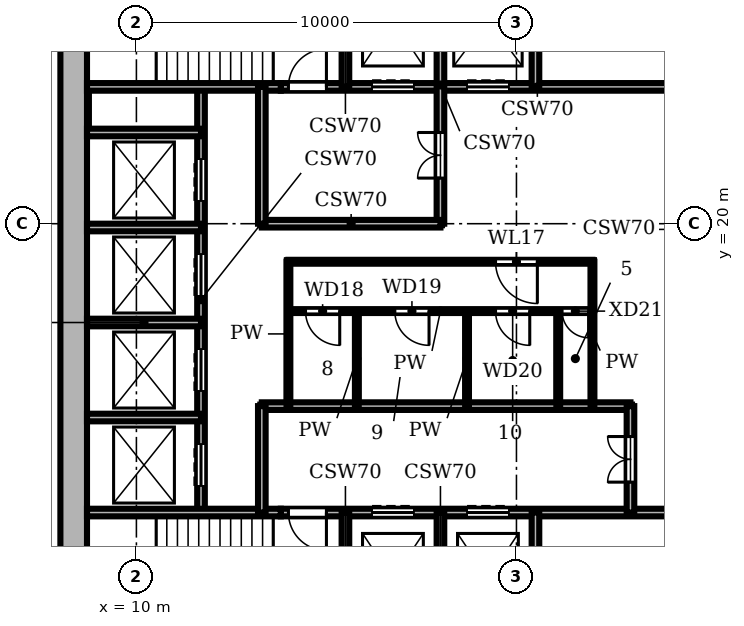
"""IFC4 building model, lengths in metres.
Left out: names, types, materials, properties, quantities, classifications, styles, units other than length and angle.
Written with IfcOpenShell. Run it as: python <this file> out.ifc"""

import sys

from ifc_helpers import new_model, si_unit, direction, frame, frame_2d, origin, place, context, subcontext, project, spatial, rectangle, extrude, element, fill, save


model = new_model("IFC4")
c1 = context("Model", 3, precision=1e-05, world=origin(), true_north=direction((0.0, 1.0)))
c2 = subcontext(c1, "Body", "Model", "MODEL_VIEW")
j1 = project(units=[si_unit("LENGTHUNIT", "METRE"), si_unit("PLANEANGLEUNIT", "RADIAN")], contexts=[c1])
p1 = place(None, origin())
s1 = spatial("IfcSite", under=j1, at=p1, CompositionType="ELEMENT")
p2 = place(p1, origin())
s2 = spatial("IfcBuilding", under=s1, at=p2, CompositionType="ELEMENT")
p3 = place(p2, frame((0.0, 0.0, 170.7)))
s3 = spatial("IfcBuildingStorey", under=s2, at=p3, CompositionType="ELEMENT", Elevation=170.7)
p4 = place(p3, frame((8.35, 27.3, 0.0), z_axis=(0.0, 0.0, 1.0), x_axis=(0.0, -1.0, 0.0)))
e1 = element("IfcWall", 1, at=p4, inside=s3, PredefinedType="SHEAR", context=c2, shape_type="SweptSolid", body=[
    extrude(rectangle(XDim=18.6, YDim=0.7, at=frame_2d((9.3, 0.0))), origin(), (0.0, 0.0, 1.0), 3.9),
])
p5 = place(p3, frame((8.7, 12.4, 0.0), z_axis=(0.0, 0.0, 1.0), x_axis=(1.0, 0.0, 0.0)))
e2 = element("IfcWall", 2, at=p5, inside=s3, PredefinedType="SHEAR", context=c2, shape_type="SweptSolid", body=[
    extrude(rectangle(XDim=5.1, YDim=0.2, at=frame_2d((2.55, 0.0))), origin(), (0.0, 0.0, 1.0), 3.58),
])
p6 = place(p3, frame((13.8, 12.4, 0.0), z_axis=(0.0, 0.0, 1.0), x_axis=(1.0, 0.0, 0.0)))
e3 = element("IfcWall", 3, at=p6, inside=s3, PredefinedType="SHEAR", context=c2, shape_type="SweptSolid", body=[
    extrude(rectangle(XDim=13.5, YDim=0.2, at=frame_2d((6.75, 0.0))), origin(), (0.0, 0.0, 1.0), 3.58),
])
p7 = place(p6, frame((2.4, 0.0, 0.0)))
e4 = element("IfcOpeningElement", 4, at=p7, cuts=e3, PredefinedType="OPENING", context=c2, shape_type="SweptSolid", body=[
    extrude(rectangle(XDim=1.1, YDim=2.1, at=frame_2d((0.55, 1.05))), frame((0.0, 0.11, 0.0), z_axis=(0.0, -1.0, 0.0), x_axis=(1.0, 0.0, 0.0)), (0.0, 0.0, 1.0), 0.22),
])
p8 = place(p6, frame((4.9, 0.0, 0.0)))
e5 = element("IfcOpeningElement", 5, at=p8, cuts=e3, PredefinedType="OPENING", context=c2, shape_type="SweptSolid", body=[
    extrude(rectangle(XDim=1.1, YDim=2.1, at=frame_2d((0.55, 1.05))), frame((0.0, 0.11, 0.0), z_axis=(0.0, -1.0, 0.0), x_axis=(1.0, 0.0, 0.0)), (0.0, 0.0, 1.0), 0.22),
])
p9 = place(p6, frame((0.2, 0.0, 0.0)))
e6 = element("IfcOpeningElement", 6, at=p9, cuts=e3, PredefinedType="OPENING", context=c2, shape_type="SweptSolid", body=[
    extrude(rectangle(XDim=1.0, YDim=2.1, at=frame_2d((0.5, 1.05))), frame((0.0, 0.11, 0.0), z_axis=(0.0, -1.0, 0.0), x_axis=(1.0, 0.0, 0.0)), (0.0, 0.0, 1.0), 0.22),
])
p10 = place(p3, frame((8.7, 14.9, 0.0), z_axis=(0.0, 0.0, 1.0), x_axis=(1.0, 0.0, 0.0)))
e7 = element("IfcWall", 7, at=p10, inside=s3, PredefinedType="SHEAR", context=c2, shape_type="SweptSolid", body=[
    extrude(rectangle(XDim=3.0, YDim=0.2, at=frame_2d((1.5, 0.0))), origin(), (0.0, 0.0, 1.0), 3.58),
])
p11 = place(p3, frame((13.3, 15.2, 0.0), z_axis=(0.0, 0.0, 1.0), x_axis=(1.0, 0.0, 0.0)))
e8 = element("IfcWall", 8, at=p11, inside=s3, PredefinedType="SHEAR", context=c2, shape_type="SweptSolid", body=[
    extrude(rectangle(XDim=9.7, YDim=0.2, at=frame_2d((4.85, 0.0))), origin(), (0.0, 0.0, 1.0), 3.58),
])
p12 = place(p3, frame((8.7, 17.4, 0.0), z_axis=(0.0, 0.0, 1.0), x_axis=(1.0, 0.0, 0.0)))
e9 = element("IfcWall", 9, at=p12, inside=s3, PredefinedType="SHEAR", context=c2, shape_type="SweptSolid", body=[
    extrude(rectangle(XDim=3.0, YDim=0.2, at=frame_2d((1.5, 0.0))), origin(), (0.0, 0.0, 1.0), 3.58),
])
p13 = place(p3, frame((14.0, 17.7, 0.0), z_axis=(0.0, 0.0, 1.0), x_axis=(1.0, 0.0, 0.0)))
e10 = element("IfcWall", 10, at=p13, inside=s3, PredefinedType="PARTITIONING", context=c2, shape_type="SweptSolid", body=[
    extrude(rectangle(XDim=8.0, YDim=0.1, at=frame_2d((4.0, 0.0))), origin(), (0.0, 0.0, 1.0), 3.58),
])
p14 = place(p13, frame((0.45, 0.0, 0.0)))
e11 = element("IfcOpeningElement", 11, at=p14, cuts=e10, PredefinedType="OPENING", context=c2, shape_type="SweptSolid", body=[
    extrude(rectangle(XDim=0.9, YDim=2.1, at=frame_2d((0.45, 1.05))), frame((0.0, 0.06, 0.0), z_axis=(0.0, -1.0, 0.0), x_axis=(1.0, 0.0, 0.0)), (0.0, 0.0, 1.0), 0.12),
])
p15 = place(p13, frame((2.8, 0.0, 0.0)))
e12 = element("IfcOpeningElement", 12, at=p15, cuts=e10, PredefinedType="OPENING", context=c2, shape_type="SweptSolid", body=[
    extrude(rectangle(XDim=0.9, YDim=2.1, at=frame_2d((0.45, 1.05))), frame((0.0, 0.06, 0.0), z_axis=(0.0, -1.0, 0.0), x_axis=(1.0, 0.0, 0.0)), (0.0, 0.0, 1.0), 0.12),
])
p16 = place(p13, frame((5.45, 0.0, 0.0)))
e13 = element("IfcOpeningElement", 13, at=p16, cuts=e10, PredefinedType="OPENING", context=c2, shape_type="SweptSolid", body=[
    extrude(rectangle(XDim=0.9, YDim=2.1, at=frame_2d((0.45, 1.05))), frame((0.0, 0.06, 0.0), z_axis=(0.0, -1.0, 0.0), x_axis=(1.0, 0.0, 0.0)), (0.0, 0.0, 1.0), 0.12),
])
p17 = place(p13, frame((7.2, 0.0, 0.0)))
e14 = element("IfcOpeningElement", 14, at=p17, cuts=e10, PredefinedType="OPENING", context=c2, shape_type="SweptSolid", body=[
    extrude(rectangle(XDim=0.7, YDim=2.1, at=frame_2d((0.35, 1.05))), frame((0.0, 0.06, 0.0), z_axis=(0.0, -1.0, 0.0), x_axis=(1.0, 0.0, 0.0)), (0.0, 0.0, 1.0), 0.12),
])
p18 = place(p3, frame((14.0, 19.0, 0.0), z_axis=(0.0, 0.0, 1.0), x_axis=(1.0, 0.0, 0.0)))
e15 = element("IfcWall", 15, at=p18, inside=s3, PredefinedType="PARTITIONING", context=c2, shape_type="SweptSolid", body=[
    extrude(rectangle(XDim=8.0, YDim=0.1, at=frame_2d((4.0, 0.0))), origin(), (0.0, 0.0, 1.0), 3.58),
])
p19 = place(p18, frame((5.45, 0.0, 0.0)))
e16 = element("IfcOpeningElement", 16, at=p19, cuts=e15, PredefinedType="OPENING", context=c2, shape_type="SweptSolid", body=[
    extrude(rectangle(XDim=1.1, YDim=2.1, at=frame_2d((0.55, 1.05))), frame((0.0, 0.06, 0.0), z_axis=(0.0, -1.0, 0.0), x_axis=(1.0, 0.0, 0.0)), (0.0, 0.0, 1.0), 0.12),
])
p20 = place(p3, frame((8.7, 19.9, 0.0), z_axis=(0.0, 0.0, 1.0), x_axis=(1.0, 0.0, 0.0)))
e17 = element("IfcWall", 17, at=p20, inside=s3, PredefinedType="SHEAR", context=c2, shape_type="SweptSolid", body=[
    extrude(rectangle(XDim=3.0, YDim=0.2, at=frame_2d((1.5, 0.0))), origin(), (0.0, 0.0, 1.0), 3.58),
])
p21 = place(p3, frame((13.3, 20.0, 0.0), z_axis=(0.0, 0.0, 1.0), x_axis=(1.0, 0.0, 0.0)))
e18 = element("IfcWall", 18, at=p21, inside=s3, PredefinedType="SHEAR", context=c2, shape_type="SweptSolid", body=[
    extrude(rectangle(XDim=4.7, YDim=0.2, at=frame_2d((2.35, 0.0))), origin(), (0.0, 0.0, 1.0), 3.58),
])
p22 = place(p3, frame((8.7, 22.4, 0.0), z_axis=(0.0, 0.0, 1.0), x_axis=(1.0, 0.0, 0.0)))
e19 = element("IfcWall", 19, at=p22, inside=s3, PredefinedType="SHEAR", context=c2, shape_type="SweptSolid", body=[
    extrude(rectangle(XDim=3.0, YDim=0.2, at=frame_2d((1.5, 0.0))), origin(), (0.0, 0.0, 1.0), 3.58),
])
p23 = place(p3, frame((8.7, 23.6, 0.0), z_axis=(0.0, 0.0, 1.0), x_axis=(1.0, 0.0, 0.0)))
e20 = element("IfcWall", 20, at=p23, inside=s3, PredefinedType="SHEAR", context=c2, shape_type="SweptSolid", body=[
    extrude(rectangle(XDim=5.1, YDim=0.2, at=frame_2d((2.55, 0.0))), origin(), (0.0, 0.0, 1.0), 3.58),
])
p24 = place(p3, frame((13.8, 23.6, 0.0), z_axis=(0.0, 0.0, 1.0), x_axis=(1.0, 0.0, 0.0)))
e21 = element("IfcWall", 21, at=p24, inside=s3, PredefinedType="SHEAR", context=c2, shape_type="SweptSolid", body=[
    extrude(rectangle(XDim=13.5, YDim=0.2, at=frame_2d((6.75, 0.0))), origin(), (0.0, 0.0, 1.0), 3.58),
])
p25 = place(p24, frame((2.4, 0.0, 0.0)))
e22 = element("IfcOpeningElement", 22, at=p25, cuts=e21, PredefinedType="OPENING", context=c2, shape_type="SweptSolid", body=[
    extrude(rectangle(XDim=1.1, YDim=2.1, at=frame_2d((0.55, 1.05))), frame((0.0, 0.11, 0.0), z_axis=(0.0, -1.0, 0.0), x_axis=(1.0, 0.0, 0.0)), (0.0, 0.0, 1.0), 0.22),
])
p26 = place(p24, frame((4.9, 0.0, 0.0)))
e23 = element("IfcOpeningElement", 23, at=p26, cuts=e21, PredefinedType="OPENING", context=c2, shape_type="SweptSolid", body=[
    extrude(rectangle(XDim=1.1, YDim=2.1, at=frame_2d((0.55, 1.05))), frame((0.0, 0.11, 0.0), z_axis=(0.0, -1.0, 0.0), x_axis=(1.0, 0.0, 0.0)), (0.0, 0.0, 1.0), 0.22),
])
p27 = place(p24, frame((0.2, 0.0, 0.0)))
e24 = element("IfcOpeningElement", 24, at=p27, cuts=e21, PredefinedType="OPENING", context=c2, shape_type="SweptSolid", body=[
    extrude(rectangle(XDim=1.0, YDim=2.1, at=frame_2d((0.5, 1.05))), frame((0.0, 0.11, 0.0), z_axis=(0.0, -1.0, 0.0), x_axis=(1.0, 0.0, 0.0)), (0.0, 0.0, 1.0), 0.22),
])
p28 = place(p3, frame((11.7, 12.4, 0.0), z_axis=(0.0, 0.0, 1.0), x_axis=(0.0, 1.0, 0.0)))
e25 = element("IfcWall", 25, at=p28, inside=s3, PredefinedType="SHEAR", context=c2, shape_type="SweptSolid", body=[
    extrude(rectangle(XDim=11.2, YDim=0.2, at=frame_2d((5.6, 0.0))), origin(), (0.0, 0.0, 1.0), 3.58),
])
p29 = place(p28, frame((0.7, 0.0, 0.0)))
e26 = element("IfcOpeningElement", 26, at=p29, cuts=e25, PredefinedType="OPENING", context=c2, shape_type="SweptSolid", body=[
    extrude(rectangle(XDim=1.1, YDim=2.1, at=frame_2d((0.55, 1.05))), frame((0.0, 0.11, 0.0), z_axis=(0.0, -1.0, 0.0), x_axis=(1.0, 0.0, 0.0)), (0.0, 0.0, 1.0), 0.22),
])
p30 = place(p28, frame((3.2, 0.0, 0.0)))
e27 = element("IfcOpeningElement", 27, at=p30, cuts=e25, PredefinedType="OPENING", context=c2, shape_type="SweptSolid", body=[
    extrude(rectangle(XDim=1.1, YDim=2.1, at=frame_2d((0.55, 1.05))), frame((0.0, 0.11, 0.0), z_axis=(0.0, -1.0, 0.0), x_axis=(1.0, 0.0, 0.0)), (0.0, 0.0, 1.0), 0.22),
])
p31 = place(p28, frame((5.7, 0.0, 0.0)))
e28 = element("IfcOpeningElement", 28, at=p31, cuts=e25, PredefinedType="OPENING", context=c2, shape_type="SweptSolid", body=[
    extrude(rectangle(XDim=1.1, YDim=2.1, at=frame_2d((0.55, 1.05))), frame((0.0, 0.11, 0.0), z_axis=(0.0, -1.0, 0.0), x_axis=(1.0, 0.0, 0.0)), (0.0, 0.0, 1.0), 0.22),
])
p32 = place(p28, frame((8.2, 0.0, 0.0)))
e29 = element("IfcOpeningElement", 29, at=p32, cuts=e25, PredefinedType="OPENING", context=c2, shape_type="SweptSolid", body=[
    extrude(rectangle(XDim=1.1, YDim=2.1, at=frame_2d((0.55, 1.05))), frame((0.0, 0.11, 0.0), z_axis=(0.0, -1.0, 0.0), x_axis=(1.0, 0.0, 0.0)), (0.0, 0.0, 1.0), 0.22),
])
p33 = place(p3, frame((13.3, 12.4, 0.0), z_axis=(0.0, 0.0, 1.0), x_axis=(0.0, 1.0, 0.0)))
e30 = element("IfcWall", 30, at=p33, inside=s3, PredefinedType="SHEAR", context=c2, shape_type="SweptSolid", body=[
    extrude(rectangle(XDim=2.8, YDim=0.2, at=frame_2d((1.4, 0.0))), origin(), (0.0, 0.0, 1.0), 3.58),
])
p34 = place(p3, frame((13.3, 20.0, 0.0), z_axis=(0.0, 0.0, 1.0), x_axis=(0.0, 1.0, 0.0)))
e31 = element("IfcWall", 31, at=p34, inside=s3, PredefinedType="SHEAR", context=c2, shape_type="SweptSolid", body=[
    extrude(rectangle(XDim=3.6, YDim=0.2, at=frame_2d((1.8, 0.0))), origin(), (0.0, 0.0, 1.0), 3.58),
])
p35 = place(p3, frame((14.0, 15.2, 0.0), z_axis=(0.0, 0.0, 1.0), x_axis=(0.0, 1.0, 0.0)))
e32 = element("IfcWall", 32, at=p35, inside=s3, PredefinedType="PARTITIONING", context=c2, shape_type="SweptSolid", body=[
    extrude(rectangle(XDim=3.8, YDim=0.1, at=frame_2d((1.9, 0.0))), origin(), (0.0, 0.0, 1.0), 3.58),
])
for number, where, z_axis, x_axis in (
    (33, (15.5, 8.7, 0.0), (0.0, 0.0, 1.0), (0.0, 1.0, 0.0)),
    (34, (15.5, 23.6, 0.0), (0.0, 0.0, 1.0), (0.0, 1.0, 0.0)),
):
    element("IfcWall", number, at=place(p3, frame(where, z_axis=z_axis, x_axis=x_axis)), inside=s3, PredefinedType="SHEAR", context=c2, shape_type="SweptSolid", body=[
        extrude(rectangle(XDim=3.7, YDim=0.2, at=frame_2d((1.85, 0.0))), origin(), (0.0, 0.0, 1.0), 3.58),
    ])
p36 = place(p3, frame((15.8, 15.2, 0.0), z_axis=(0.0, 0.0, 1.0), x_axis=(0.0, 1.0, 0.0)))
e35 = element("IfcWall", 35, at=p36, inside=s3, PredefinedType="PARTITIONING", context=c2, shape_type="SweptSolid", body=[
    extrude(rectangle(XDim=2.5, YDim=0.1, at=frame_2d((1.25, 0.0))), origin(), (0.0, 0.0, 1.0), 3.58),
])
p37 = place(p3, frame((18.0, 8.7, 0.0), z_axis=(0.0, 0.0, 1.0), x_axis=(0.0, 1.0, 0.0)))
e36 = element("IfcWall", 36, at=p37, inside=s3, PredefinedType="SHEAR", context=c2, shape_type="SweptSolid", body=[
    extrude(rectangle(XDim=3.7, YDim=0.2, at=frame_2d((1.85, 0.0))), origin(), (0.0, 0.0, 1.0), 3.58),
])
p38 = place(p3, frame((18.0, 20.0, 0.0), z_axis=(0.0, 0.0, 1.0), x_axis=(0.0, 1.0, 0.0)))
e37 = element("IfcWall", 37, at=p38, inside=s3, PredefinedType="SHEAR", context=c2, shape_type="SweptSolid", body=[
    extrude(rectangle(XDim=7.3, YDim=0.2, at=frame_2d((3.65, 0.0))), origin(), (0.0, 0.0, 1.0), 3.58),
])
p39 = place(p38, frame((1.2, 0.0, 0.0)))
e38 = element("IfcOpeningElement", 38, at=p39, cuts=e37, PredefinedType="OPENING", context=c2, shape_type="SweptSolid", body=[
    extrude(rectangle(XDim=1.2, YDim=2.1, at=frame_2d((0.6, 1.05))), frame((0.0, 0.11, 0.0), z_axis=(0.0, -1.0, 0.0), x_axis=(1.0, 0.0, 0.0)), (0.0, 0.0, 1.0), 0.22),
])
p40 = place(p3, frame((18.7, 15.2, 0.0), z_axis=(0.0, 0.0, 1.0), x_axis=(0.0, 1.0, 0.0)))
e39 = element("IfcWall", 39, at=p40, inside=s3, PredefinedType="PARTITIONING", context=c2, shape_type="SweptSolid", body=[
    extrude(rectangle(XDim=2.5, YDim=0.1, at=frame_2d((1.25, 0.0))), origin(), (0.0, 0.0, 1.0), 3.58),
])
for number, where, z_axis, x_axis in (
    (40, (20.5, 8.7, 0.0), (0.0, 0.0, 1.0), (0.0, 1.0, 0.0)),
    (41, (20.5, 23.6, 0.0), (0.0, 0.0, 1.0), (0.0, 1.0, 0.0)),
):
    element("IfcWall", number, at=place(p3, frame(where, z_axis=z_axis, x_axis=x_axis)), inside=s3, PredefinedType="SHEAR", context=c2, shape_type="SweptSolid", body=[
        extrude(rectangle(XDim=3.7, YDim=0.2, at=frame_2d((1.85, 0.0))), origin(), (0.0, 0.0, 1.0), 3.58),
    ])
p41 = place(p3, frame((21.1, 15.2, 0.0), z_axis=(0.0, 0.0, 1.0), x_axis=(0.0, 1.0, 0.0)))
e42 = element("IfcWall", 42, at=p41, inside=s3, PredefinedType="PARTITIONING", context=c2, shape_type="SweptSolid", body=[
    extrude(rectangle(XDim=2.5, YDim=0.1, at=frame_2d((1.25, 0.0))), origin(), (0.0, 0.0, 1.0), 3.58),
])
p42 = place(p3, frame((22.0, 15.2, 0.0), z_axis=(0.0, 0.0, 1.0), x_axis=(0.0, 1.0, 0.0)))
e43 = element("IfcWall", 43, at=p42, inside=s3, PredefinedType="PARTITIONING", context=c2, shape_type="SweptSolid", body=[
    extrude(rectangle(XDim=3.8, YDim=0.1, at=frame_2d((1.9, 0.0))), origin(), (0.0, 0.0, 1.0), 3.58),
])
p43 = place(p3, frame((23.0, 12.4, 0.0), z_axis=(0.0, 0.0, 1.0), x_axis=(0.0, 1.0, 0.0)))
e44 = element("IfcWall", 44, at=p43, inside=s3, PredefinedType="SHEAR", context=c2, shape_type="SweptSolid", body=[
    extrude(rectangle(XDim=2.8, YDim=0.2, at=frame_2d((1.4, 0.0))), origin(), (0.0, 0.0, 1.0), 3.58),
])
p44 = place(p43, frame((0.8, 0.0, 0.0)))
e45 = element("IfcOpeningElement", 45, at=p44, cuts=e44, PredefinedType="OPENING", context=c2, shape_type="SweptSolid", body=[
    extrude(rectangle(XDim=1.2, YDim=2.1, at=frame_2d((0.6, 1.05))), frame((0.0, 0.11, 0.0), z_axis=(0.0, -1.0, 0.0), x_axis=(1.0, 0.0, 0.0)), (0.0, 0.0, 1.0), 0.22),
])
p45 = place(p29, origin())
e46 = element("IfcDoor", 46, at=p45, inside=s3, OperationType="DOUBLE_DOOR_SLIDING", PredefinedType="DOOR", context=c2, shape_type="SweptSolid", body=[
    extrude(rectangle(XDim=1.1, YDim=2.1, at=frame_2d((0.55, 1.05))), frame((0.0, 0.025, 0.0), z_axis=(0.0, -1.0, 0.0), x_axis=(1.0, 0.0, 0.0)), (0.0, 0.0, 1.0), 0.05),
])
fill(e26, e46)
p46 = place(p30, origin())
e47 = element("IfcDoor", 47, at=p46, inside=s3, OperationType="DOUBLE_DOOR_SLIDING", PredefinedType="DOOR", context=c2, shape_type="SweptSolid", body=[
    extrude(rectangle(XDim=1.1, YDim=2.1, at=frame_2d((0.55, 1.05))), frame((0.0, 0.025, 0.0), z_axis=(0.0, -1.0, 0.0), x_axis=(1.0, 0.0, 0.0)), (0.0, 0.0, 1.0), 0.05),
])
fill(e27, e47)
p47 = place(p31, origin())
e48 = element("IfcDoor", 48, at=p47, inside=s3, OperationType="DOUBLE_DOOR_SLIDING", PredefinedType="DOOR", context=c2, shape_type="SweptSolid", body=[
    extrude(rectangle(XDim=1.1, YDim=2.1, at=frame_2d((0.55, 1.05))), frame((0.0, 0.025, 0.0), z_axis=(0.0, -1.0, 0.0), x_axis=(1.0, 0.0, 0.0)), (0.0, 0.0, 1.0), 0.05),
])
fill(e28, e48)
p48 = place(p32, origin())
e49 = element("IfcDoor", 49, at=p48, inside=s3, OperationType="DOUBLE_DOOR_SLIDING", PredefinedType="DOOR", context=c2, shape_type="SweptSolid", body=[
    extrude(rectangle(XDim=1.1, YDim=2.1, at=frame_2d((0.55, 1.05))), frame((0.0, 0.025, 0.0), z_axis=(0.0, -1.0, 0.0), x_axis=(1.0, 0.0, 0.0)), (0.0, 0.0, 1.0), 0.05),
])
fill(e29, e49)
p49 = place(p7, origin())
e50 = element("IfcDoor", 50, at=p49, inside=s3, OperationType="DOUBLE_DOOR_SLIDING", PredefinedType="DOOR", context=c2, shape_type="SweptSolid", body=[
    extrude(rectangle(XDim=1.1, YDim=2.1, at=frame_2d((0.55, 1.05))), frame((0.0, 0.025, 0.0), z_axis=(0.0, -1.0, 0.0), x_axis=(1.0, 0.0, 0.0)), (0.0, 0.0, 1.0), 0.05),
])
fill(e4, e50)
p50 = place(p8, origin())
e51 = element("IfcDoor", 51, at=p50, inside=s3, OperationType="DOUBLE_DOOR_SLIDING", PredefinedType="DOOR", context=c2, shape_type="SweptSolid", body=[
    extrude(rectangle(XDim=1.1, YDim=2.1, at=frame_2d((0.55, 1.05))), frame((0.0, 0.025, 0.0), z_axis=(0.0, -1.0, 0.0), x_axis=(1.0, 0.0, 0.0)), (0.0, 0.0, 1.0), 0.05),
])
fill(e5, e51)
p51 = place(p25, origin())
e52 = element("IfcDoor", 52, at=p51, inside=s3, OperationType="DOUBLE_DOOR_SLIDING", PredefinedType="DOOR", context=c2, shape_type="SweptSolid", body=[
    extrude(rectangle(XDim=1.1, YDim=2.1, at=frame_2d((0.55, 1.05))), frame((0.0, 0.025, 0.0), z_axis=(0.0, -1.0, 0.0), x_axis=(1.0, 0.0, 0.0)), (0.0, 0.0, 1.0), 0.05),
])
fill(e22, e52)
p52 = place(p26, origin())
e53 = element("IfcDoor", 53, at=p52, inside=s3, OperationType="DOUBLE_DOOR_SLIDING", PredefinedType="DOOR", context=c2, shape_type="SweptSolid", body=[
    extrude(rectangle(XDim=1.1, YDim=2.1, at=frame_2d((0.55, 1.05))), frame((0.0, 0.025, 0.0), z_axis=(0.0, -1.0, 0.0), x_axis=(1.0, 0.0, 0.0)), (0.0, 0.0, 1.0), 0.05),
])
fill(e23, e53)
p53 = place(p9, frame((1.0, 0.0, 0.0), z_axis=(0.0, 0.0, 1.0), x_axis=(-1.0, 0.0, 0.0)))
e54 = element("IfcDoor", 54, at=p53, inside=s3, OperationType="SINGLE_SWING_LEFT", PredefinedType="DOOR", context=c2, shape_type="SweptSolid", body=[
    extrude(rectangle(XDim=1.0, YDim=2.1, at=frame_2d((0.5, 1.05))), frame((0.0, 0.025, 0.0), z_axis=(0.0, -1.0, 0.0), x_axis=(1.0, 0.0, 0.0)), (0.0, 0.0, 1.0), 0.05),
])
fill(e6, e54)
p54 = place(p27, origin())
e55 = element("IfcDoor", 55, at=p54, inside=s3, OperationType="SINGLE_SWING_RIGHT", PredefinedType="DOOR", context=c2, shape_type="SweptSolid", body=[
    extrude(rectangle(XDim=1.0, YDim=2.1, at=frame_2d((0.5, 1.05))), frame((0.0, 0.025, 0.0), z_axis=(0.0, -1.0, 0.0), x_axis=(1.0, 0.0, 0.0)), (0.0, 0.0, 1.0), 0.05),
])
fill(e24, e55)
p55 = place(p44, origin())
e56 = element("IfcDoor", 56, at=p55, inside=s3, OperationType="DOUBLE_DOOR_SINGLE_SWING", PredefinedType="DOOR", context=c2, shape_type="SweptSolid", body=[
    extrude(rectangle(XDim=1.2, YDim=2.1, at=frame_2d((0.6, 1.05))), frame((0.0, 0.025, 0.0), z_axis=(0.0, -1.0, 0.0), x_axis=(1.0, 0.0, 0.0)), (0.0, 0.0, 1.0), 0.05),
])
fill(e45, e56)
p56 = place(p39, origin())
e57 = element("IfcDoor", 57, at=p56, inside=s3, OperationType="DOUBLE_DOOR_SINGLE_SWING", PredefinedType="DOOR", context=c2, shape_type="SweptSolid", body=[
    extrude(rectangle(XDim=1.2, YDim=2.1, at=frame_2d((0.6, 1.05))), frame((0.0, 0.025, 0.0), z_axis=(0.0, -1.0, 0.0), x_axis=(1.0, 0.0, 0.0)), (0.0, 0.0, 1.0), 0.05),
])
fill(e38, e57)
p57 = place(p19, frame((1.1, 0.0, 0.0), z_axis=(0.0, 0.0, 1.0), x_axis=(-1.0, 0.0, 0.0)))
e58 = element("IfcDoor", 58, at=p57, inside=s3, OperationType="SINGLE_SWING_LEFT", PredefinedType="DOOR", context=c2, shape_type="SweptSolid", body=[
    extrude(rectangle(XDim=1.1, YDim=2.1, at=frame_2d((0.55, 1.05))), frame((0.0, 0.025, 0.0), z_axis=(0.0, -1.0, 0.0), x_axis=(1.0, 0.0, 0.0)), (0.0, 0.0, 1.0), 0.05),
])
fill(e16, e58)
p58 = place(p14, frame((0.9, 0.0, 0.0), z_axis=(0.0, 0.0, 1.0), x_axis=(-1.0, 0.0, 0.0)))
e59 = element("IfcDoor", 59, at=p58, inside=s3, OperationType="SINGLE_SWING_LEFT", PredefinedType="DOOR", context=c2, shape_type="SweptSolid", body=[
    extrude(rectangle(XDim=0.9, YDim=2.1, at=frame_2d((0.45, 1.05))), frame((0.0, 0.025, 0.0), z_axis=(0.0, -1.0, 0.0), x_axis=(1.0, 0.0, 0.0)), (0.0, 0.0, 1.0), 0.05),
])
fill(e11, e59)
p59 = place(p15, frame((0.9, 0.0, 0.0), z_axis=(0.0, 0.0, 1.0), x_axis=(-1.0, 0.0, 0.0)))
e60 = element("IfcDoor", 60, at=p59, inside=s3, OperationType="SINGLE_SWING_LEFT", PredefinedType="DOOR", context=c2, shape_type="SweptSolid", body=[
    extrude(rectangle(XDim=0.9, YDim=2.1, at=frame_2d((0.45, 1.05))), frame((0.0, 0.025, 0.0), z_axis=(0.0, -1.0, 0.0), x_axis=(1.0, 0.0, 0.0)), (0.0, 0.0, 1.0), 0.05),
])
fill(e12, e60)
p60 = place(p16, frame((0.9, 0.0, 0.0), z_axis=(0.0, 0.0, 1.0), x_axis=(-1.0, 0.0, 0.0)))
e61 = element("IfcDoor", 61, at=p60, inside=s3, OperationType="SINGLE_SWING_LEFT", PredefinedType="DOOR", context=c2, shape_type="SweptSolid", body=[
    extrude(rectangle(XDim=0.9, YDim=2.1, at=frame_2d((0.45, 1.05))), frame((0.0, 0.025, 0.0), z_axis=(0.0, -1.0, 0.0), x_axis=(1.0, 0.0, 0.0)), (0.0, 0.0, 1.0), 0.05),
])
fill(e13, e61)
p61 = place(p17, frame((0.7, 0.0, 0.0), z_axis=(0.0, 0.0, 1.0), x_axis=(-1.0, 0.0, 0.0)))
e62 = element("IfcDoor", 62, at=p61, inside=s3, OperationType="SINGLE_SWING_LEFT", PredefinedType="DOOR", context=c2, shape_type="SweptSolid", body=[
    extrude(rectangle(XDim=0.7, YDim=2.1, at=frame_2d((0.35, 1.05))), frame((0.0, 0.025, 0.0), z_axis=(0.0, -1.0, 0.0), x_axis=(1.0, 0.0, 0.0)), (0.0, 0.0, 1.0), 0.05),
])
fill(e14, e62)
save(model, sys.argv[1])
